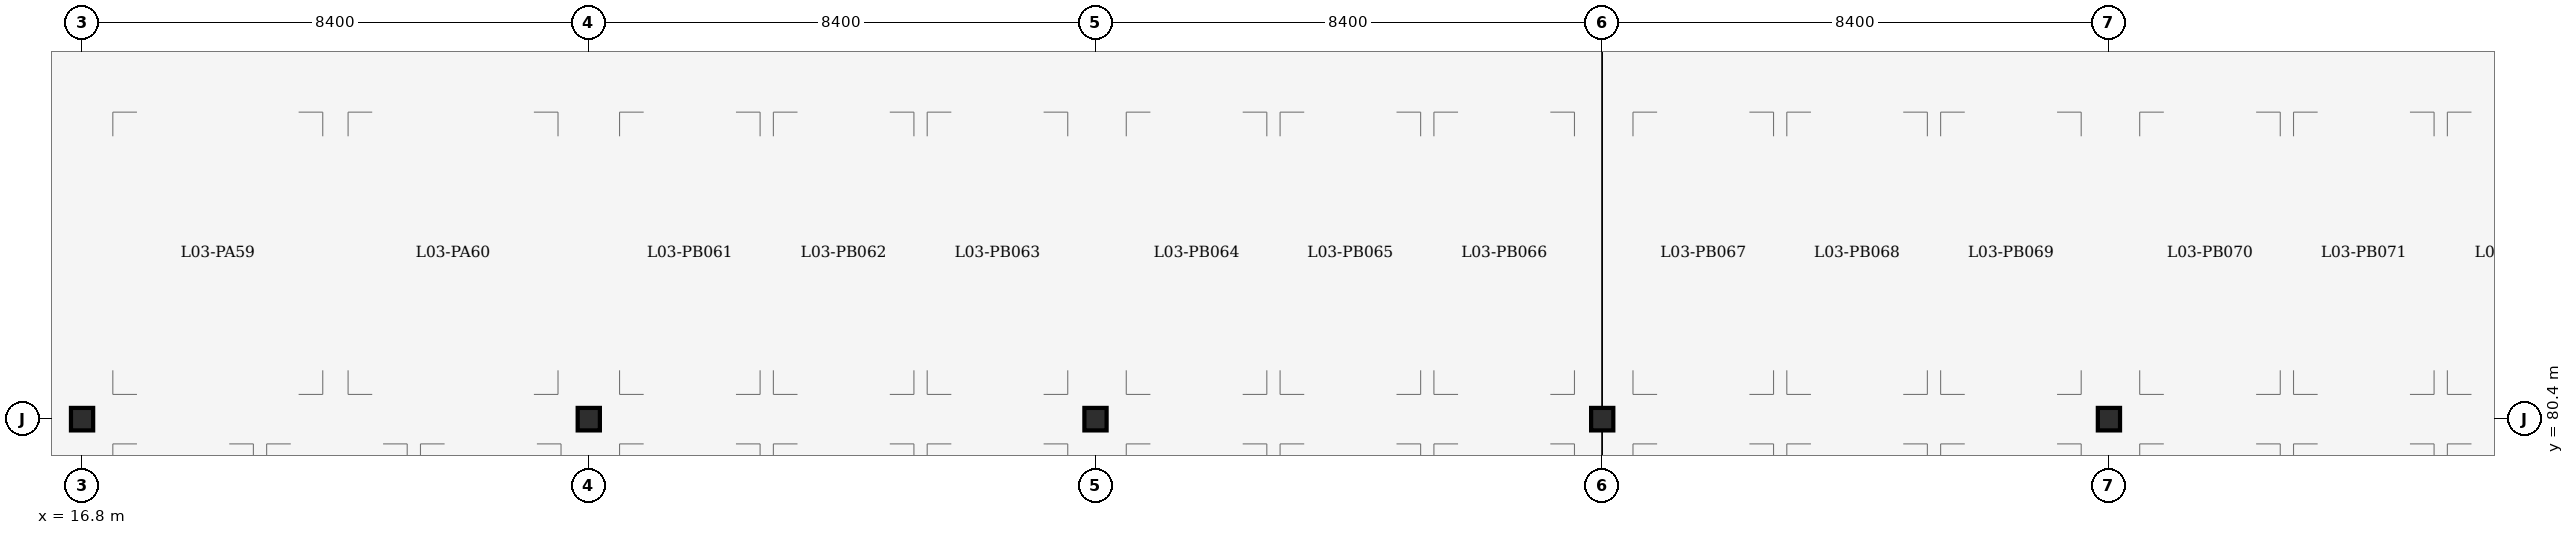
"""IFC4 building model, lengths in metres.
Left out: names, types, materials, properties, quantities, classifications, styles, units other than length and angle.
Written with IfcOpenShell. Run it as: python <this file> out.ifc"""

import sys

from ifc_helpers import new_model, si_unit, direction, frame, origin, origin_2d, place, context, subcontext, project, spatial, i_section, extrude, element, save


model = new_model("IFC4")
c1 = context("Model", 3, precision=1e-05, world=origin(), true_north=direction((0.0, 1.0)))
c2 = subcontext(c1, "Body", "Model", "MODEL_VIEW")
j1 = project(units=[si_unit("LENGTHUNIT", "METRE"), si_unit("PLANEANGLEUNIT", "RADIAN")], contexts=[c1])
p1 = place(None, origin())
s1 = spatial("IfcSite", under=j1, at=p1, CompositionType="ELEMENT")
p2 = place(p1, origin())
s2 = spatial("IfcBuilding", under=s1, at=p2, CompositionType="ELEMENT")
p3 = place(p2, frame((0.0, 0.0, 12.6)))
s3 = spatial("IfcBuildingStorey", under=s2, at=p3, CompositionType="ELEMENT", Elevation=12.6)
for number, where, z_axis, x_axis in (
    (1, (16.8, 80.4, 0.0), (0.0, 0.0, 1.0), (1.0, 0.0, 0.0)),
    (2, (25.2, 80.4, 0.0), (0.0, 0.0, 1.0), (1.0, 0.0, 0.0)),
    (3, (33.6, 80.4, 0.0), (0.0, 0.0, 1.0), (1.0, 0.0, 0.0)),
    (4, (42.0, 80.4, 0.0), (0.0, 0.0, 1.0), (1.0, 0.0, 0.0)),
    (5, (50.4, 80.4, 0.0), (0.0, 0.0, 1.0), (1.0, 0.0, 0.0)),
):
    element("IfcColumn", number, at=place(p3, frame(where, z_axis=z_axis, x_axis=x_axis)), inside=s3, PredefinedType="COLUMN", context=c2, shape_type="SweptSolid", body=[
        extrude(i_section(OverallWidth=0.373, OverallDepth=0.368, WebThickness=0.014, FlangeThickness=0.024, FilletRadius=0.015, at=origin_2d()), origin(), (0.0, 0.0, 1.0), 3.6),
    ])
save(model, sys.argv[1])
